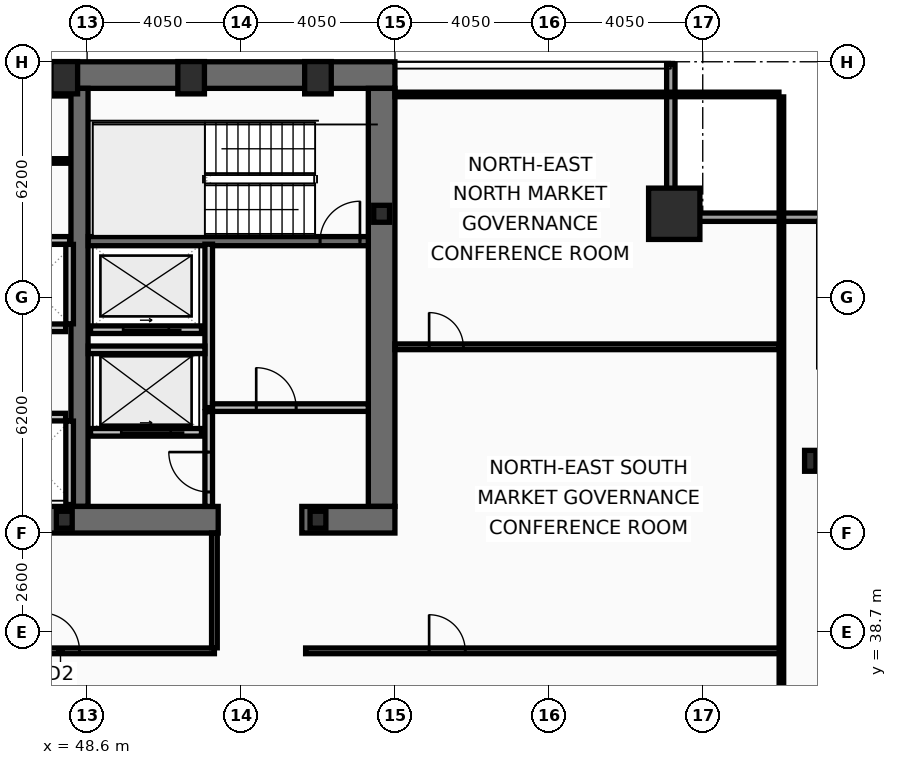
"""IFC4 building model, lengths in metres.
Left out: names, types, materials, properties, quantities, classifications, styles, units other than length and angle.
Written with IfcOpenShell. Run it as: python <this file> out.ifc"""

import sys

from ifc_helpers import new_model, si_unit, direction, frame, frame_2d, origin, origin_2d, place, context, subcontext, project, spatial, rectangle, hollow_rectangle, i_section, extrude, element, fill, save


model = new_model("IFC4")
c1 = context("Model", 3, precision=1e-05, world=origin(), true_north=direction((0.0, 1.0)))
c2 = subcontext(c1, "Body", "Model", "MODEL_VIEW")
j1 = project(units=[si_unit("LENGTHUNIT", "METRE"), si_unit("PLANEANGLEUNIT", "RADIAN")], contexts=[c1])
p1 = place(None, origin())
s1 = spatial("IfcSite", under=j1, at=p1, CompositionType="ELEMENT")
p2 = place(p1, origin())
s2 = spatial("IfcBuilding", under=s1, at=p2, CompositionType="ELEMENT")
p3 = place(p2, frame((0.0, 0.0, 165.0)))
s3 = spatial("IfcBuildingStorey", under=s2, at=p3, CompositionType="ELEMENT", Elevation=165.0)
p4 = place(p3, frame((16.2, 53.35, 0.0), z_axis=(0.0, 0.0, 1.0), x_axis=(1.0, 0.0, 0.0)))
e1 = element("IfcWall", 1, at=p4, inside=s3, PredefinedType="SHEAR", context=c2, shape_type="SweptSolid", body=[
    extrude(rectangle(XDim=40.5, YDim=0.7, at=frame_2d((20.25, 0.0))), origin(), (0.0, 0.0, 1.0), 3.44),
])
p5 = place(p3, frame((56.35, 53.0, 0.0), z_axis=(0.0, 0.0, 1.0), x_axis=(0.0, -1.0, 0.0)))
e2 = element("IfcWall", 2, at=p5, inside=s3, PredefinedType="SHEAR", context=c2, shape_type="SweptSolid", body=[
    extrude(rectangle(XDim=11.0, YDim=0.7, at=frame_2d((5.5, 0.0))), origin(), (0.0, 0.0, 1.0), 3.44),
])
p6 = place(p3, frame((48.4, 42.0, 0.0), z_axis=(0.0, 0.0, 1.0), x_axis=(0.0, 1.0, 0.0)))
e3 = element("IfcWall", 3, at=p6, inside=s3, PredefinedType="SHEAR", context=c2, shape_type="SweptSolid", body=[
    extrude(rectangle(XDim=11.0, YDim=0.45, at=frame_2d((5.5, 0.0))), origin(), (0.0, 0.0, 1.0), 3.44),
])
p7 = place(p3, frame((52.05, 41.65, 0.0), z_axis=(0.0, 0.0, 1.0), x_axis=(-1.0, 0.0, 0.0)))
e4 = element("IfcWall", 4, at=p7, inside=s3, PredefinedType="SHEAR", context=c2, shape_type="SweptSolid", body=[
    extrude(rectangle(XDim=11.3, YDim=0.7, at=frame_2d((5.65, 0.0))), origin(), (0.0, 0.0, 1.0), 3.44),
])
p8 = place(p3, frame((56.7, 41.65, 0.0), z_axis=(0.0, 0.0, 1.0), x_axis=(-1.0, 0.0, 0.0)))
e5 = element("IfcWall", 5, at=p8, inside=s3, PredefinedType="SHEAR", context=c2, shape_type="SweptSolid", body=[
    extrude(rectangle(XDim=2.45, YDim=0.7, at=frame_2d((1.225, 0.0))), origin(), (0.0, 0.0, 1.0), 3.44),
])
p9 = place(p3, frame((48.63, 48.98, 0.0), z_axis=(0.0, 0.0, 1.0), x_axis=(1.0, 0.0, 0.0)))
e6 = element("IfcWall", 6, at=p9, inside=s3, PredefinedType="SHEAR", context=c2, shape_type="SweptSolid", body=[
    extrude(rectangle(XDim=7.37, YDim=0.24, at=frame_2d((3.685, 0.0))), origin(), (0.0, 0.0, 1.0), 3.44),
])
p10 = place(p9, frame((6.1, 0.0, 0.0)))
e7 = element("IfcOpeningElement", 7, at=p10, cuts=e6, PredefinedType="OPENING", context=c2, shape_type="SweptSolid", body=[
    extrude(rectangle(XDim=1.05, YDim=2.15, at=frame_2d((0.525, 1.075))), frame((0.0, 0.13, 0.0), z_axis=(0.0, -1.0, 0.0), x_axis=(1.0, 0.0, 0.0)), (0.0, 0.0, 1.0), 0.26),
])
p11 = place(p3, frame((64.05, 49.7, 0.0), z_axis=(0.0, 0.0, 1.0), x_axis=(1.0, 0.0, 0.0)))
e8 = element("IfcColumn", 8, at=p11, inside=s3, PredefinedType="COLUMN", context=c2, shape_type="SweptSolid", body=[
    extrude(hollow_rectangle(XDim=1.35, YDim=1.35, WallThickness=0.065, at=origin_2d()), origin(), (0.0, 0.0, 1.0), 3.6),
])
for number, where, z_axis, x_axis in (
    (9, (48.0, 53.28, 0.0), (0.0, 0.0, 1.0), (1.0, 0.0, 0.0)),
    (10, (51.337, 53.28, 0.0), (0.0, 0.0, 1.0), (1.0, 0.0, 0.0)),
    (11, (54.675, 53.28, 0.0), (0.0, 0.0, 1.0), (1.0, 0.0, 0.0)),
):
    element("IfcColumn", number, at=place(p3, frame(where, z_axis=z_axis, x_axis=x_axis)), inside=s3, PredefinedType="COLUMN", context=c2, shape_type="SweptSolid", body=[
        extrude(hollow_rectangle(XDim=0.7, YDim=0.85, WallThickness=0.05, at=origin_2d()), origin(), (0.0, 0.0, 1.0), 3.6),
    ])
p12 = place(p3, frame((67.63, 43.2, 0.0), z_axis=(0.0, 0.0, 1.0), x_axis=(1.0, 0.0, 0.0)))
e12 = element("IfcColumn", 12, at=p12, inside=s3, PredefinedType="COLUMN", context=c2, shape_type="SweptSolid", body=[
    extrude(i_section(OverallWidth=0.3, OverallDepth=0.55, WebThickness=0.015, FlangeThickness=0.029, at=origin_2d()), origin(), (0.0, 0.0, 1.0), 3.6),
])
for number, where, z_axis, x_axis in (
    (13, (56.35, 49.7, 0.0), (0.0, 0.0, 1.0), (1.0, 0.0, 0.0)),
    (14, (48.0, 41.65, 0.0), (0.0, 0.0, 1.0), (1.0, 0.0, 0.0)),
    (15, (54.675, 41.65, 0.0), (0.0, 0.0, 1.0), (1.0, 0.0, 0.0)),
):
    element("IfcColumn", number, at=place(p3, frame(where, z_axis=z_axis, x_axis=x_axis)), inside=s3, PredefinedType="COLUMN", context=c2, shape_type="SweptSolid", body=[
        extrude(i_section(OverallWidth=0.416, OverallDepth=0.446, WebThickness=0.039, FlangeThickness=0.063, at=origin_2d()), origin(), (0.0, 0.0, 1.0), 3.6),
    ])
p13 = place(p3, frame((63.96, 53.63, 0.0), z_axis=(0.0, 0.0, 1.0), x_axis=(0.0, -1.0, 0.0)))
e16 = element("IfcWall", 16, at=p13, inside=s3, PredefinedType="SOLIDWALL", context=c2, shape_type="SweptSolid", body=[
    extrude(rectangle(XDim=3.91, YDim=0.22, at=frame_2d((1.955, 0.0))), origin(), (0.0, 0.0, 1.0), 2.83),
])
p14 = place(p3, frame((63.85, 49.61, 0.0), z_axis=(0.0, 0.0, 1.0), x_axis=(1.0, 0.0, 0.0)))
e17 = element("IfcWall", 17, at=p14, inside=s3, PredefinedType="SOLIDWALL", context=c2, shape_type="SweptSolid", body=[
    extrude(rectangle(XDim=4.22, YDim=0.22, at=frame_2d((2.11, 0.0))), origin(), (0.0, 0.0, 1.0), 2.83),
])
p15 = place(p3, frame((51.61, 43.95, 0.0), z_axis=(0.0, 0.0, 1.0), x_axis=(-1.0, 0.0, 0.0)))
e18 = element("IfcWall", 18, at=p15, inside=s3, PredefinedType="PARTITIONING", context=c2, shape_type="SweptSolid", body=[
    extrude(rectangle(XDim=2.92, YDim=0.2, at=frame_2d((1.46, 0.0))), origin(), (0.0, 0.0, 1.0), 3.44),
])
p16 = place(p15, frame((0.81, 0.0, 0.0)))
e19 = element("IfcOpeningElement", 19, at=p16, cuts=e18, PredefinedType="OPENING", context=c2, shape_type="SweptSolid", body=[
    extrude(rectangle(XDim=1.3, YDim=2.18, at=frame_2d((0.65, 1.09))), frame((0.0, 0.11, 0.0), z_axis=(0.0, -1.0, 0.0), x_axis=(1.0, 0.0, 0.0)), (0.0, 0.0, 1.0), 0.22),
])
p17 = place(p3, frame((51.61, 46.65, 0.0), z_axis=(0.0, 0.0, 1.0), x_axis=(-1.0, 0.0, 0.0)))
e20 = element("IfcWall", 20, at=p17, inside=s3, PredefinedType="PARTITIONING", context=c2, shape_type="SweptSolid", body=[
    extrude(rectangle(XDim=2.92, YDim=0.2, at=frame_2d((1.46, 0.0))), origin(), (0.0, 0.0, 1.0), 3.44),
])
p18 = place(p17, frame((0.86, 0.0, 0.0)))
e21 = element("IfcOpeningElement", 21, at=p18, cuts=e20, PredefinedType="OPENING", context=c2, shape_type="SweptSolid", body=[
    extrude(rectangle(XDim=1.2, YDim=2.18, at=frame_2d((0.6, 1.09))), frame((0.0, 0.11, 0.0), z_axis=(0.0, -1.0, 0.0), x_axis=(1.0, 0.0, 0.0)), (0.0, 0.0, 1.0), 0.22),
])
p19 = place(p3, frame((51.8, 44.6, 0.0), z_axis=(0.0, 0.0, 1.0), x_axis=(0.0, 1.0, 0.0)))
e22 = element("IfcWall", 22, at=p19, inside=s3, PredefinedType="PARTITIONING", context=c2, shape_type="SweptSolid", body=[
    extrude(rectangle(XDim=4.3, YDim=0.2, at=frame_2d((2.15, 0.0))), origin(), (0.0, 0.0, 1.0), 3.44),
])
p20 = place(p3, frame((51.9, 44.6, 0.0), z_axis=(0.0, 0.0, 1.0), x_axis=(1.0, 0.0, 0.0)))
e23 = element("IfcWall", 23, at=p20, inside=s3, PredefinedType="PARTITIONING", context=c2, shape_type="SweptSolid", body=[
    extrude(rectangle(XDim=4.1, YDim=0.2, at=frame_2d((2.05, 0.0))), origin(), (0.0, 0.0, 1.0), 3.44),
])
p21 = place(p20, frame((1.15, 0.0, 0.0)))
e24 = element("IfcOpeningElement", 24, at=p21, cuts=e23, PredefinedType="OPENING", context=c2, shape_type="SweptSolid", body=[
    extrude(rectangle(XDim=1.05, YDim=2.15, at=frame_2d((0.525, 1.075))), frame((0.0, 0.11, 0.0), z_axis=(0.0, -1.0, 0.0), x_axis=(1.0, 0.0, 0.0)), (0.0, 0.0, 1.0), 0.22),
])
p22 = place(p3, frame((48.63, 46.12, 0.0), z_axis=(0.0, 0.0, 1.0), x_axis=(1.0, 0.0, 0.0)))
e25 = element("IfcWall", 25, at=p22, inside=s3, PredefinedType="PARTITIONING", context=c2, shape_type="SweptSolid", body=[
    extrude(rectangle(XDim=3.07, YDim=0.2, at=frame_2d((1.535, 0.0))), origin(), (0.0, 0.0, 1.0), 3.44),
])
p23 = place(p3, frame((51.8, 42.0, 0.0), z_axis=(0.0, 0.0, 1.0), x_axis=(0.0, 1.0, 0.0)))
e26 = element("IfcWall", 26, at=p23, inside=s3, PredefinedType="PARTITIONING", context=c2, shape_type="SweptSolid", body=[
    extrude(rectangle(XDim=2.495, YDim=0.2, at=frame_2d((1.248, 0.0))), origin(), (0.0, 0.0, 1.0), 3.44),
])
p24 = place(p23, frame((0.38, 0.0, 0.0)))
e27 = element("IfcOpeningElement", 27, at=p24, cuts=e26, PredefinedType="OPENING", context=c2, shape_type="SweptSolid", body=[
    extrude(rectangle(XDim=1.05, YDim=2.15, at=frame_2d((0.525, 1.075))), frame((0.0, 0.11, 0.0), z_axis=(0.0, -1.0, 0.0), x_axis=(1.0, 0.0, 0.0)), (0.0, 0.0, 1.0), 0.22),
])
p25 = place(p3, frame((41.825, 46.7, 0.0), z_axis=(0.0, 0.0, 1.0), x_axis=(1.0, 0.0, 0.0)))
e28 = element("IfcWall", 28, at=p25, inside=s3, PredefinedType="PARTITIONING", context=c2, shape_type="SweptSolid", body=[
    extrude(rectangle(XDim=6.21, YDim=0.2, at=frame_2d((3.105, 0.0))), origin(), (0.0, 0.0, 1.0), 3.44),
])
p26 = place(p3, frame((48.14, 46.805, 0.0), z_axis=(0.0, 0.0, 1.0), x_axis=(0.0, 1.0, 0.0)))
e29 = element("IfcWall", 29, at=p26, inside=s3, PredefinedType="PARTITIONING", context=c2, shape_type="SweptSolid", body=[
    extrude(rectangle(XDim=2.09, YDim=0.2, at=frame_2d((1.045, 0.0))), origin(), (0.0, 0.0, 1.0), 3.44),
])
p27 = place(p3, frame((41.825, 44.35, 0.0), z_axis=(0.0, 0.0, 1.0), x_axis=(1.0, 0.0, 0.0)))
e30 = element("IfcWall", 30, at=p27, inside=s3, PredefinedType="PARTITIONING", context=c2, shape_type="SweptSolid", body=[
    extrude(rectangle(XDim=6.21, YDim=0.2, at=frame_2d((3.105, 0.0))), origin(), (0.0, 0.0, 1.0), 3.44),
])
p28 = place(p3, frame((48.14, 42.05, 0.0), z_axis=(0.0, 0.0, 1.0), x_axis=(0.0, 1.0, 0.0)))
e31 = element("IfcWall", 31, at=p28, inside=s3, PredefinedType="PARTITIONING", context=c2, shape_type="SweptSolid", body=[
    extrude(rectangle(XDim=2.195, YDim=0.2, at=frame_2d((1.098, 0.0))), origin(), (0.0, 0.0, 1.0), 3.44),
])
p29 = place(p3, frame((40.58, 52.86, 0.0), z_axis=(0.0, 0.0, 1.0), x_axis=(1.0, 0.0, 0.0)))
e32 = element("IfcWall", 32, at=p29, inside=s3, PredefinedType="PARTITIONING", context=c2, shape_type="SweptSolid", body=[
    extrude(rectangle(XDim=7.56, YDim=0.12, at=frame_2d((3.78, 0.0))), origin(), (0.0, 0.0, 1.0), 3.44),
])
p30 = place(p3, frame((40.58, 49.0, 0.0), z_axis=(0.0, 0.0, 1.0), x_axis=(1.0, 0.0, 0.0)))
e33 = element("IfcWall", 33, at=p30, inside=s3, PredefinedType="PARTITIONING", context=c2, shape_type="SweptSolid", body=[
    extrude(rectangle(XDim=7.56, YDim=0.2, at=frame_2d((3.78, 0.0))), origin(), (0.0, 0.0, 1.0), 3.44),
])
p31 = place(p30, frame((0.16, 0.0, 0.0)))
e34 = element("IfcOpeningElement", 34, at=p31, cuts=e33, PredefinedType="OPENING", context=c2, shape_type="SweptSolid", body=[
    extrude(rectangle(XDim=0.95, YDim=2.1, at=frame_2d((0.475, 1.05))), frame((0.0, 0.11, 0.0), z_axis=(0.0, -1.0, 0.0), x_axis=(1.0, 0.0, 0.0)), (0.0, 0.0, 1.0), 0.22),
])
p32 = place(p3, frame((40.63, 51.09, 0.0), z_axis=(0.0, 0.0, 1.0), x_axis=(1.0, 0.0, 0.0)))
e35 = element("IfcWall", 35, at=p32, inside=s3, PredefinedType="PARTITIONING", context=c2, shape_type="SweptSolid", body=[
    extrude(rectangle(XDim=7.46, YDim=0.12, at=frame_2d((3.73, 0.0))), origin(), (0.0, 0.0, 1.0), 3.44),
])
p33 = place(p32, frame((2.4, 0.0, 0.0)))
e36 = element("IfcOpeningElement", 36, at=p33, cuts=e35, PredefinedType="OPENING", context=c2, shape_type="SweptSolid", body=[
    extrude(rectangle(XDim=0.9, YDim=2.05, at=frame_2d((0.45, 1.025))), frame((0.0, 0.07, 0.0), z_axis=(0.0, -1.0, 0.0), x_axis=(1.0, 0.0, 0.0)), (0.0, 0.0, 1.0), 0.14),
])
p34 = place(p3, frame((46.3, 38.2, 0.0), z_axis=(0.0, 0.0, 1.0), x_axis=(1.0, 0.0, 0.0)))
e37 = element("IfcWall", 37, at=p34, inside=s3, PredefinedType="PARTITIONING", context=c2, shape_type="SweptSolid", body=[
    extrude(rectangle(XDim=5.65, YDim=0.15, at=frame_2d((2.825, 0.0))), origin(), (0.0, 0.0, 1.0), 2.73),
])
p35 = place(p34, frame((1.1, 0.0, 0.0)))
e38 = element("IfcOpeningElement", 38, at=p35, cuts=e37, PredefinedType="OPENING", context=c2, shape_type="SweptSolid", body=[
    extrude(rectangle(XDim=1.0, YDim=2.05, at=frame_2d((0.5, 1.025))), frame((0.0, 0.085, 0.0), z_axis=(0.0, -1.0, 0.0), x_axis=(1.0, 0.0, 0.0)), (0.0, 0.0, 1.0), 0.17),
])
p36 = place(p3, frame((51.95, 38.28, 0.0), z_axis=(0.0, 0.0, 1.0), x_axis=(0.0, 1.0, 0.0)))
e39 = element("IfcWall", 39, at=p36, inside=s3, PredefinedType="PARTITIONING", context=c2, shape_type="SweptSolid", body=[
    extrude(rectangle(XDim=3.02, YDim=0.15, at=frame_2d((1.51, 0.0))), origin(), (0.0, 0.0, 1.0), 3.44),
])
p37 = place(p3, frame((54.35, 38.2, 0.0), z_axis=(0.0, 0.0, 1.0), x_axis=(1.0, 0.0, 0.0)))
e40 = element("IfcWall", 40, at=p37, inside=s3, PredefinedType="PARTITIONING", context=c2, shape_type="SweptSolid", body=[
    extrude(rectangle(XDim=12.52, YDim=0.15, at=frame_2d((6.26, 0.0))), origin(), (0.0, 0.0, 1.0), 2.73),
])
p38 = place(p37, frame((3.25, 0.0, 0.0)))
e41 = element("IfcOpeningElement", 41, at=p38, cuts=e40, PredefinedType="OPENING", context=c2, shape_type="SweptSolid", body=[
    extrude(rectangle(XDim=0.95, YDim=2.05, at=frame_2d((0.475, 1.025))), frame((0.0, 0.085, 0.0), z_axis=(0.0, -1.0, 0.0), x_axis=(1.0, 0.0, 0.0)), (0.0, 0.0, 1.0), 0.17),
])
p39 = place(p3, frame((56.7, 46.2, 0.0), z_axis=(0.0, 0.0, 1.0), x_axis=(1.0, 0.0, 0.0)))
e42 = element("IfcWall", 42, at=p39, inside=s3, PredefinedType="PARTITIONING", context=c2, shape_type="SweptSolid", body=[
    extrude(rectangle(XDim=10.105, YDim=0.15, at=frame_2d((5.052, 0.0))), origin(), (0.0, 0.0, 1.0), 2.83),
])
p40 = place(p39, frame((0.9, 0.0, 0.0)))
e43 = element("IfcOpeningElement", 43, at=p40, cuts=e42, PredefinedType="OPENING", context=c2, shape_type="SweptSolid", body=[
    extrude(rectangle(XDim=0.9, YDim=2.05, at=frame_2d((0.45, 1.025))), frame((0.0, 0.085, 0.0), z_axis=(0.0, -1.0, 0.0), x_axis=(1.0, 0.0, 0.0)), (0.0, 0.0, 1.0), 0.17),
])
p41 = place(p3, frame((66.87, 10.665, 0.0), z_axis=(0.0, 0.0, 1.0), x_axis=(0.0, 1.0, 0.0)))
e44 = element("IfcWall", 44, at=p41, inside=s3, PredefinedType="PARTITIONING", context=c2, shape_type="SweptSolid", body=[
    extrude(rectangle(XDim=42.11, YDim=0.12, at=frame_2d((21.055, 0.0))), origin(), (0.0, 0.0, 1.0), 2.73),
])
p42 = place(p3, frame((56.7, 52.84, 0.0), z_axis=(0.0, 0.0, 1.0), x_axis=(1.0, 0.0, 0.0)))
e45 = element("IfcWall", 45, at=p42, inside=s3, PredefinedType="PARTITIONING", context=c2, shape_type="SweptSolid", body=[
    extrude(rectangle(XDim=10.105, YDim=0.12, at=frame_2d((5.052, 0.0))), origin(), (0.0, 0.0, 1.0), 3.44),
])
p43 = place(p10, origin())
e46 = element("IfcDoor", 46, at=p43, inside=s3, OperationType="SINGLE_SWING_RIGHT", PredefinedType="DOOR", context=c2, shape_type="SweptSolid", body=[
    extrude(rectangle(XDim=1.05, YDim=2.15, at=frame_2d((0.525, 1.075))), frame((0.0, 0.025, 0.0), z_axis=(0.0, -1.0, 0.0), x_axis=(1.0, 0.0, 0.0)), (0.0, 0.0, 1.0), 0.05),
])
fill(e7, e46)
p44 = place(p16, origin())
e47 = element("IfcDoor", 47, at=p44, inside=s3, OperationType="SLIDING_TO_LEFT", PredefinedType="DOOR", context=c2, shape_type="SweptSolid", body=[
    extrude(rectangle(XDim=1.3, YDim=2.18, at=frame_2d((0.65, 1.09))), frame((0.0, 0.025, 0.0), z_axis=(0.0, -1.0, 0.0), x_axis=(1.0, 0.0, 0.0)), (0.0, 0.0, 1.0), 0.05),
])
fill(e19, e47)
p45 = place(p18, origin())
e48 = element("IfcDoor", 48, at=p45, inside=s3, OperationType="SLIDING_TO_LEFT", PredefinedType="DOOR", context=c2, shape_type="SweptSolid", body=[
    extrude(rectangle(XDim=1.2, YDim=2.18, at=frame_2d((0.6, 1.09))), frame((0.0, 0.025, 0.0), z_axis=(0.0, -1.0, 0.0), x_axis=(1.0, 0.0, 0.0)), (0.0, 0.0, 1.0), 0.05),
])
fill(e21, e48)
p46 = place(p21, origin())
e49 = element("IfcDoor", 49, at=p46, inside=s3, OperationType="SINGLE_SWING_LEFT", PredefinedType="DOOR", context=c2, shape_type="SweptSolid", body=[
    extrude(rectangle(XDim=1.05, YDim=2.15, at=frame_2d((0.525, 1.075))), frame((0.0, 0.025, 0.0), z_axis=(0.0, -1.0, 0.0), x_axis=(1.0, 0.0, 0.0)), (0.0, 0.0, 1.0), 0.05),
])
fill(e24, e49)
p47 = place(p24, origin())
e50 = element("IfcDoor", 50, at=p47, inside=s3, OperationType="SINGLE_SWING_RIGHT", PredefinedType="DOOR", context=c2, shape_type="SweptSolid", body=[
    extrude(rectangle(XDim=1.05, YDim=2.15, at=frame_2d((0.525, 1.075))), frame((0.0, 0.025, 0.0), z_axis=(0.0, -1.0, 0.0), x_axis=(1.0, 0.0, 0.0)), (0.0, 0.0, 1.0), 0.05),
])
fill(e27, e50)
p48 = place(p35, origin())
e51 = element("IfcDoor", 51, at=p48, inside=s3, OperationType="SINGLE_SWING_LEFT", PredefinedType="DOOR", context=c2, shape_type="SweptSolid", body=[
    extrude(rectangle(XDim=1.0, YDim=2.05, at=frame_2d((0.5, 1.025))), frame((0.0, 0.025, 0.0), z_axis=(0.0, -1.0, 0.0), x_axis=(1.0, 0.0, 0.0)), (0.0, 0.0, 1.0), 0.05),
])
fill(e38, e51)
p49 = place(p38, origin())
e52 = element("IfcDoor", 52, at=p49, inside=s3, OperationType="SINGLE_SWING_LEFT", PredefinedType="DOOR", context=c2, shape_type="SweptSolid", body=[
    extrude(rectangle(XDim=0.95, YDim=2.05, at=frame_2d((0.475, 1.025))), frame((0.0, 0.025, 0.0), z_axis=(0.0, -1.0, 0.0), x_axis=(1.0, 0.0, 0.0)), (0.0, 0.0, 1.0), 0.05),
])
fill(e41, e52)
p50 = place(p40, origin())
e53 = element("IfcDoor", 53, at=p50, inside=s3, OperationType="SINGLE_SWING_LEFT", PredefinedType="DOOR", context=c2, shape_type="SweptSolid", body=[
    extrude(rectangle(XDim=0.9, YDim=2.05, at=frame_2d((0.45, 1.025))), frame((0.0, 0.025, 0.0), z_axis=(0.0, -1.0, 0.0), x_axis=(1.0, 0.0, 0.0)), (0.0, 0.0, 1.0), 0.05),
])
fill(e43, e53)
save(model, sys.argv[1])
